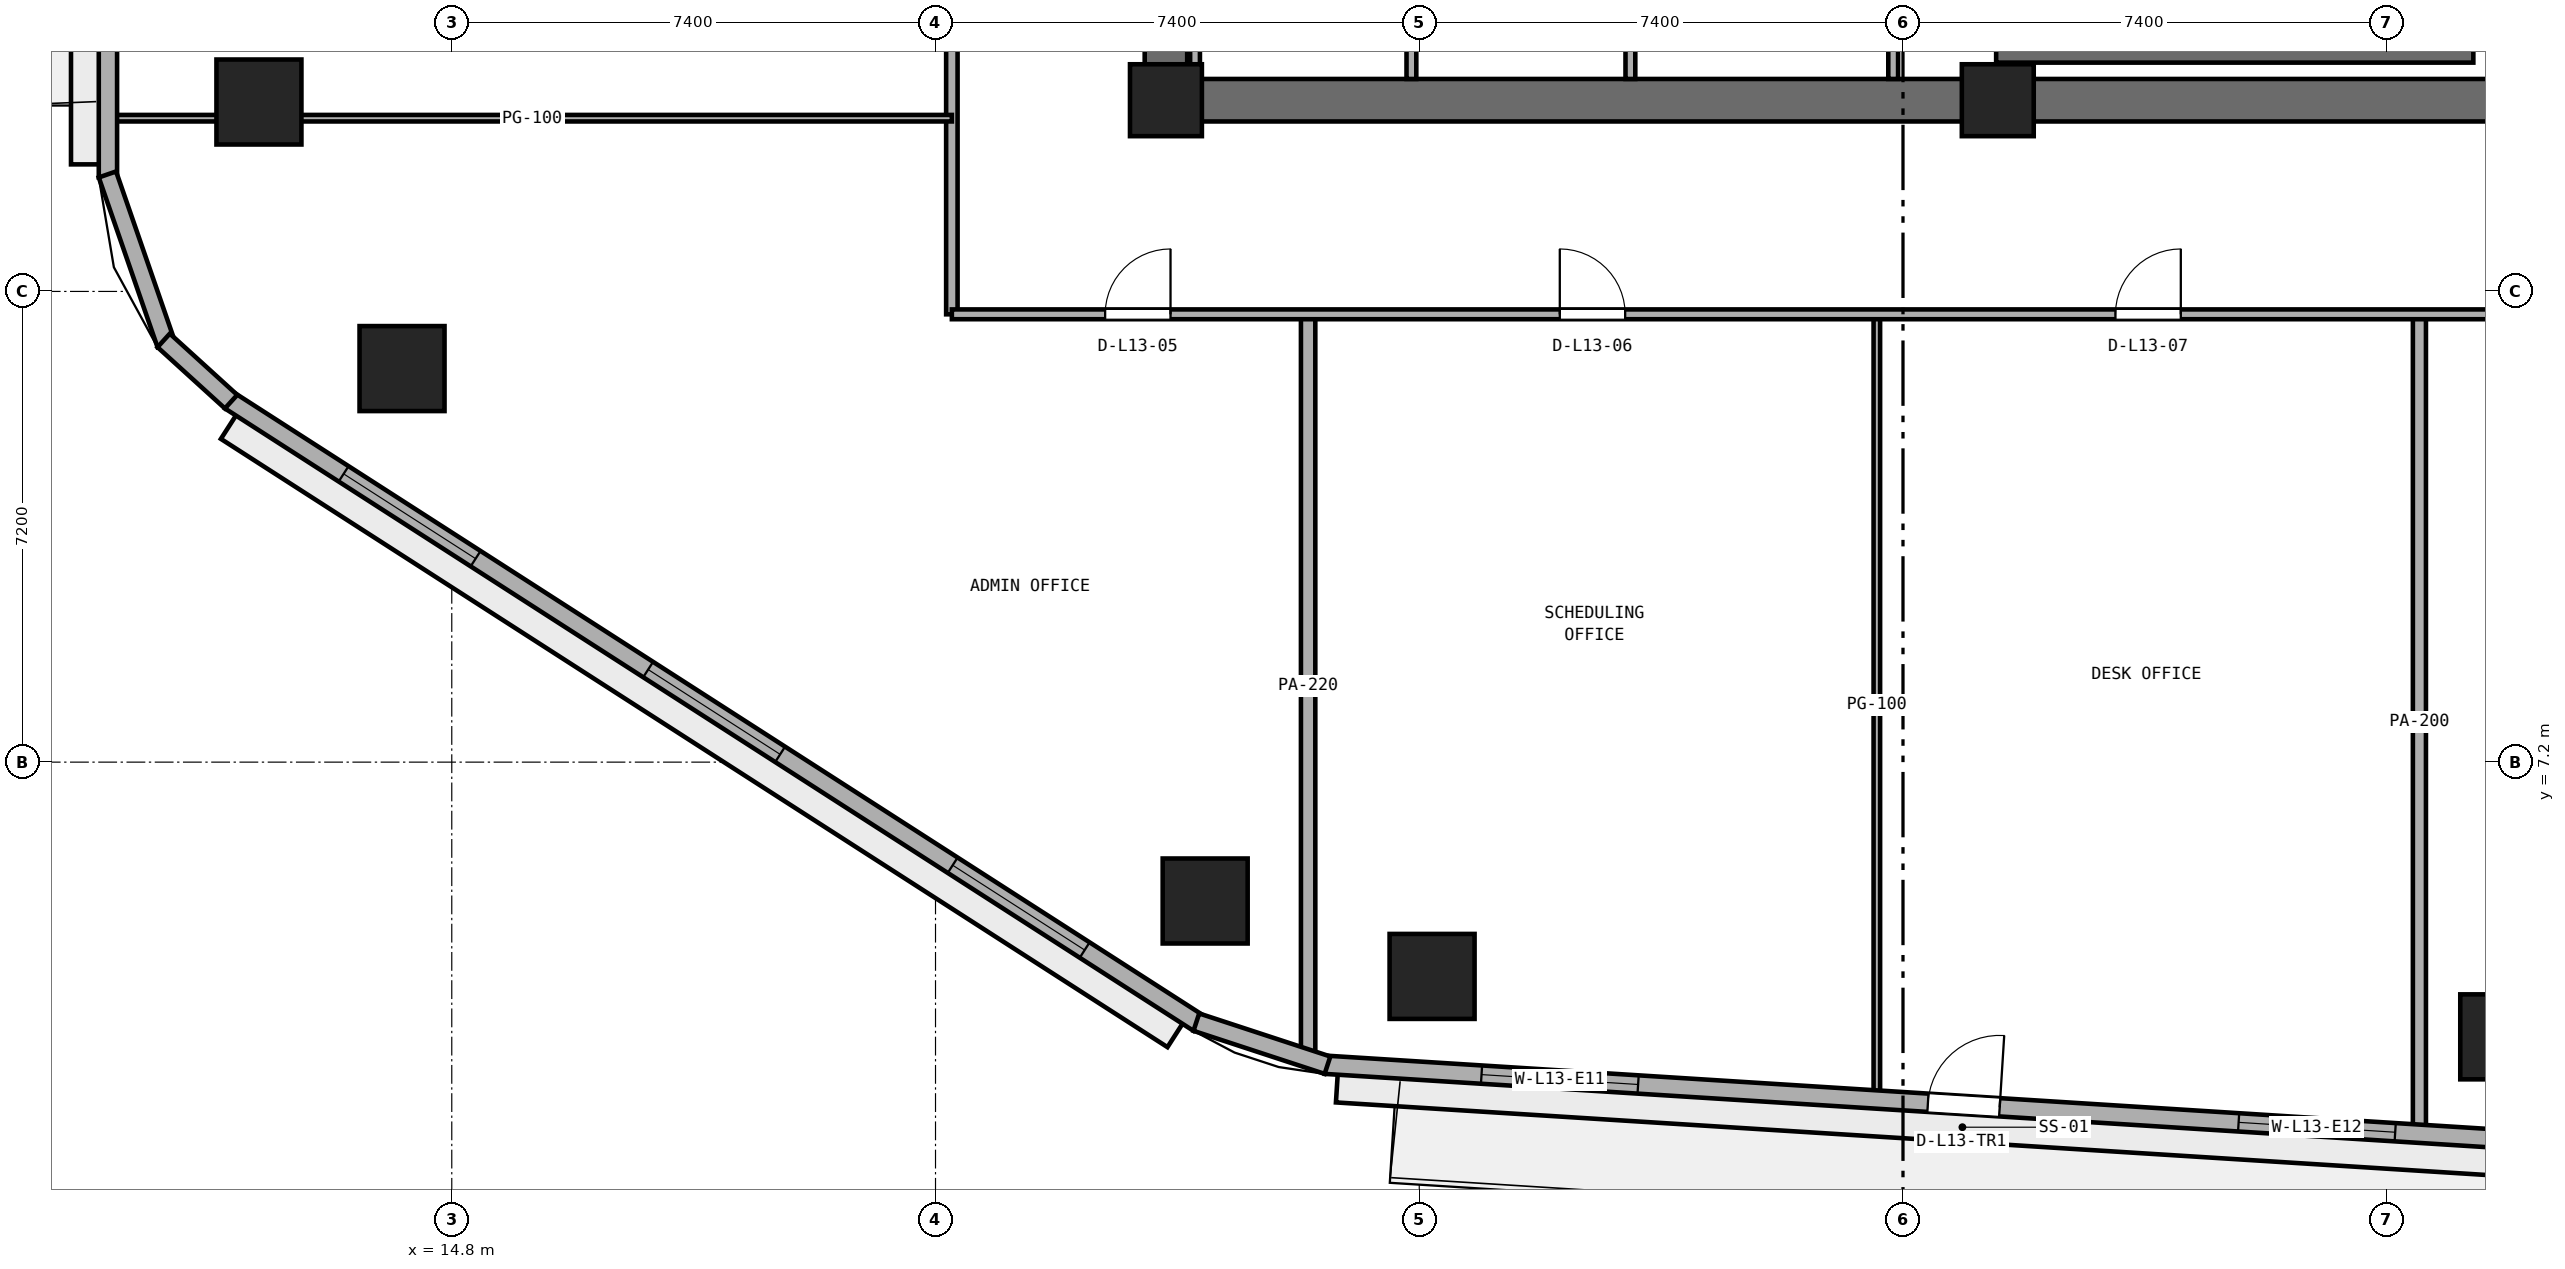
"""IFC4 building model, lengths in metres.
Left out: names, types, materials, properties, quantities, classifications, styles, units other than length and angle.
Written with IfcOpenShell. Run it as: python <this file> out.ifc"""

import sys

from ifc_helpers import new_model, si_unit, direction, frame, frame_2d, origin, origin_2d, place, context, subcontext, project, spatial, rectangle, extrude, element, fill, save


model = new_model("IFC4")
c1 = context("Model", 3, precision=1e-05, world=origin(), true_north=direction((0.0, 1.0)))
c2 = subcontext(c1, "Body", "Model", "MODEL_VIEW")
j1 = project(units=[si_unit("LENGTHUNIT", "METRE"), si_unit("PLANEANGLEUNIT", "RADIAN")], contexts=[c1])
p1 = place(None, origin())
s1 = spatial("IfcSite", under=j1, at=p1, CompositionType="ELEMENT")
p2 = place(p1, origin())
s2 = spatial("IfcBuilding", under=s1, at=p2, CompositionType="ELEMENT")
p3 = place(p2, frame((0.0, 0.0, 55.4)))
s3 = spatial("IfcBuildingStorey", under=s2, at=p3, CompositionType="ELEMENT", Elevation=55.4)
p4 = place(p3, frame((25.4, 17.325, 0.0), z_axis=(0.0, 0.0, 1.0), x_axis=(1.0, 0.0, 0.0)))
e1 = element("IfcWall", 1, at=p4, inside=s3, PredefinedType="SHEAR", context=c2, shape_type="SweptSolid", body=[
    extrude(rectangle(XDim=23.2, YDim=0.65, at=frame_2d((11.6, 0.0))), origin(), (0.0, 0.0, 1.0), 3.525),
])
p5 = place(p3, frame((25.725, 17.65, 0.0), z_axis=(0.0, 0.0, 1.0), x_axis=(0.0, 1.0, 0.0)))
e2 = element("IfcWall", 2, at=p5, inside=s3, PredefinedType="SHEAR", context=c2, shape_type="SweptSolid", body=[
    extrude(rectangle(XDim=15.1, YDim=0.65, at=frame_2d((7.55, 0.0))), origin(), (0.0, 0.0, 1.0), 3.525),
])
p6 = place(p5, frame((6.8, 0.0, 0.0)))
e3 = element("IfcOpeningElement", 3, at=p6, cuts=e2, PredefinedType="OPENING", context=c2, shape_type="SweptSolid", body=[
    extrude(rectangle(XDim=1.5, YDim=2.15, at=frame_2d((0.75, 1.075))), frame((0.0, 0.335, 0.0), z_axis=(0.0, -1.0, 0.0), x_axis=(1.0, 0.0, 0.0)), (0.0, 0.0, 1.0), 0.67),
])
for number, where, z_axis, x_axis in (
    (4, (25.725, 17.325, 0.0), (0.0, 0.0, 1.0), (1.0, 0.0, 0.0)),
    (5, (38.45, 17.325, 0.0), (0.0, 0.0, 1.0), (1.0, 0.0, 0.0)),
):
    element("IfcColumn", number, at=place(p3, frame(where, z_axis=z_axis, x_axis=x_axis)), inside=s3, PredefinedType="PILASTER", context=c2, shape_type="SweptSolid", body=[
        extrude(rectangle(XDim=1.1, YDim=1.1, at=origin_2d()), origin(), (0.0, 0.0, 1.0), 3.8),
    ])
for number, where, z_axis, x_axis in (
    (6, (29.796, 3.922, 0.0), (0.0, 0.0, 1.0), (1.0, 0.0, 0.0)),
    (7, (46.175, 2.998, 0.0), (0.0, 0.0, 1.0), (1.0, 0.0, 0.0)),
    (8, (11.85, 17.298, 0.0), (0.0, 0.0, 1.0), (1.0, 0.0, 0.0)),
    (9, (14.039, 13.22, 0.0), (0.0, 0.0, 1.0), (1.0, 0.0, 0.0)),
    (10, (26.325, 5.076, 0.0), (0.0, 0.0, 1.0), (1.0, 0.0, 0.0)),
):
    element("IfcColumn", number, at=place(p3, frame(where, z_axis=z_axis, x_axis=x_axis)), inside=s3, PredefinedType="COLUMN", context=c2, shape_type="SweptSolid", body=[
        extrude(rectangle(XDim=1.3, YDim=1.3, at=origin_2d()), origin(), (0.0, 0.0, 1.0), 3.8),
    ])
p7 = place(p3, frame((38.425, 18.025, 0.0), z_axis=(0.0, 0.0, 1.0), x_axis=(1.0, 0.0, 0.0)))
e11 = element("IfcWall", 11, at=p7, inside=s3, PredefinedType="SHEAR", context=c2, shape_type="SweptSolid", body=[
    extrude(rectangle(XDim=7.3, YDim=0.25, at=frame_2d((3.65, 0.0))), origin(), (0.0, 0.0, 1.0), 3.525),
])
for number, where, z_axis, x_axis in (
    (12, (26.17, 17.65, 0.0), (0.0, 0.0, 1.0), (0.0, 1.0, 0.0)),
    (13, (29.48, 17.65, 0.0), (0.0, 0.0, 1.0), (0.0, 1.0, 0.0)),
    (14, (32.83, 17.65, 0.0), (0.0, 0.0, 1.0), (0.0, 1.0, 0.0)),
    (15, (36.85, 17.65, 0.0), (0.0, 0.0, 1.0), (0.0, 1.0, 0.0)),
):
    element("IfcWall", number, at=place(p3, frame(where, z_axis=z_axis, x_axis=x_axis)), inside=s3, PredefinedType="PARTITIONING", context=c2, shape_type="SweptSolid", body=[
        extrude(rectangle(XDim=2.1, YDim=0.15, at=frame_2d((1.05, 0.0))), origin(), (0.0, 0.0, 1.0), 3.525),
    ])
p8 = place(p3, frame((44.9, 1.58, 0.0), z_axis=(0.0, 0.0, 1.0), x_axis=(0.0, 1.0, 0.0)))
e16 = element("IfcWall", 16, at=p8, inside=s3, PredefinedType="PARTITIONING", context=c2, shape_type="SweptSolid", body=[
    extrude(rectangle(XDim=12.47, YDim=0.2, at=frame_2d((6.235, 0.0))), origin(), (0.0, 0.0, 1.0), 3.525),
])
p9 = place(p3, frame((36.6, 2.104, 0.0), z_axis=(0.0, 0.0, 1.0), x_axis=(0.0, 1.0, 0.0)))
e17 = element("IfcWall", 17, at=p9, inside=s3, PredefinedType="PARTITIONING", context=c2, shape_type="SweptSolid", body=[
    extrude(rectangle(XDim=11.947, YDim=0.1, at=frame_2d((5.973, 0.0))), origin(), (0.0, 0.0, 1.0), 3.525),
])
p10 = place(p3, frame((27.9, 2.674, 0.0), z_axis=(0.0, 0.0, 1.0), x_axis=(0.0, 1.0, 0.0)))
e18 = element("IfcWall", 18, at=p10, inside=s3, PredefinedType="PARTITIONING", context=c2, shape_type="SweptSolid", body=[
    extrude(rectangle(XDim=11.376, YDim=0.22, at=frame_2d((5.688, 0.0))), origin(), (0.0, 0.0, 1.0), 3.525),
])
p11 = place(p3, frame((22.45, 14.05, 0.0), z_axis=(0.0, 0.0, 1.0), x_axis=(0.0, 1.0, 0.0)))
e19 = element("IfcWall", 19, at=p11, inside=s3, PredefinedType="PARTITIONING", context=c2, shape_type="SweptSolid", body=[
    extrude(rectangle(XDim=22.3, YDim=0.175, at=frame_2d((11.15, 0.0))), origin(), (0.0, 0.0, 1.0), 3.525),
])
p12 = place(p11, frame((5.075, 0.0, 0.0)))
e20 = element("IfcOpeningElement", 20, at=p12, cuts=e19, PredefinedType="OPENING", context=c2, shape_type="SweptSolid", body=[
    extrude(rectangle(XDim=0.9, YDim=2.1, at=frame_2d((0.45, 1.05))), frame((0.0, 0.097, 0.0), z_axis=(0.0, -1.0, 0.0), x_axis=(1.0, 0.0, 0.0)), (0.0, 0.0, 1.0), 0.195),
])
p13 = place(p11, frame((11.35, 0.0, 0.0)))
e21 = element("IfcOpeningElement", 21, at=p13, cuts=e19, PredefinedType="OPENING", context=c2, shape_type="SweptSolid", body=[
    extrude(rectangle(XDim=0.9, YDim=2.1, at=frame_2d((0.45, 1.05))), frame((0.0, 0.097, 0.0), z_axis=(0.0, -1.0, 0.0), x_axis=(1.0, 0.0, 0.0)), (0.0, 0.0, 1.0), 0.195),
])
p14 = place(p11, frame((16.975, 0.0, 0.0)))
e22 = element("IfcOpeningElement", 22, at=p14, cuts=e19, PredefinedType="OPENING", context=c2, shape_type="SweptSolid", body=[
    extrude(rectangle(XDim=0.9, YDim=2.1, at=frame_2d((0.45, 1.05))), frame((0.0, 0.097, 0.0), z_axis=(0.0, -1.0, 0.0), x_axis=(1.0, 0.0, 0.0)), (0.0, 0.0, 1.0), 0.195),
])
p15 = place(p3, frame((22.45, 14.05, 0.0), z_axis=(0.0, 0.0, 1.0), x_axis=(1.0, 0.0, 0.0)))
e23 = element("IfcWall", 23, at=p15, inside=s3, PredefinedType="PARTITIONING", context=c2, shape_type="SweptSolid", body=[
    extrude(rectangle(XDim=29.1, YDim=0.15, at=frame_2d((14.55, 0.0))), origin(), (0.0, 0.0, 1.0), 3.525),
])
p16 = place(p15, frame((2.345, 0.0, 0.0)))
e24 = element("IfcOpeningElement", 24, at=p16, cuts=e23, PredefinedType="OPENING", context=c2, shape_type="SweptSolid", body=[
    extrude(rectangle(XDim=1.0, YDim=2.12, at=frame_2d((0.5, 1.06))), frame((0.0, 0.085, 0.0), z_axis=(0.0, -1.0, 0.0), x_axis=(1.0, 0.0, 0.0)), (0.0, 0.0, 1.0), 0.17),
])
p17 = place(p15, frame((9.3, 0.0, 0.0)))
e25 = element("IfcOpeningElement", 25, at=p17, cuts=e23, PredefinedType="OPENING", context=c2, shape_type="SweptSolid", body=[
    extrude(rectangle(XDim=1.0, YDim=2.12, at=frame_2d((0.5, 1.06))), frame((0.0, 0.085, 0.0), z_axis=(0.0, -1.0, 0.0), x_axis=(1.0, 0.0, 0.0)), (0.0, 0.0, 1.0), 0.17),
])
p18 = place(p15, frame((17.8, 0.0, 0.0)))
e26 = element("IfcOpeningElement", 26, at=p18, cuts=e23, PredefinedType="OPENING", context=c2, shape_type="SweptSolid", body=[
    extrude(rectangle(XDim=1.0, YDim=2.12, at=frame_2d((0.5, 1.06))), frame((0.0, 0.085, 0.0), z_axis=(0.0, -1.0, 0.0), x_axis=(1.0, 0.0, 0.0)), (0.0, 0.0, 1.0), 0.17),
])
p19 = place(p15, frame((25.155, 0.0, 0.0)))
e27 = element("IfcOpeningElement", 27, at=p19, cuts=e23, PredefinedType="OPENING", context=c2, shape_type="SweptSolid", body=[
    extrude(rectangle(XDim=1.0, YDim=2.12, at=frame_2d((0.5, 1.06))), frame((0.0, 0.085, 0.0), z_axis=(0.0, -1.0, 0.0), x_axis=(1.0, 0.0, 0.0)), (0.0, 0.0, 1.0), 0.17),
])
p20 = place(p3, frame((9.605, 17.05, 0.0), z_axis=(0.0, 0.0, 1.0), x_axis=(1.0, 0.0, 0.0)))
e28 = element("IfcWall", 28, at=p20, inside=s3, PredefinedType="PARTITIONING", context=c2, shape_type="SweptSolid", body=[
    extrude(rectangle(XDim=12.845, YDim=0.1, at=frame_2d((6.422, 0.0))), origin(), (0.0, 0.0, 1.0), 3.525),
])
p21 = place(p3, frame((28.161, 2.571, 0.0), z_axis=(0.0, 0.0, 1.0), x_axis=(0.998017288298, -0.06294038654, 0.0)))
e29 = element("IfcWall", 29, at=p21, inside=s3, PredefinedType="STANDARD", context=c2, shape_type="SweptSolid", body=[
    extrude(rectangle(XDim=19.577, YDim=0.28, at=frame_2d((9.789, 0.0))), origin(), (0.0, 0.0, 1.0), 3.525),
])
p22 = place(p21, frame((9.239, 0.0, 0.0)))
e30 = element("IfcOpeningElement", 30, at=p22, cuts=e29, PredefinedType="OPENING", context=c2, shape_type="SweptSolid", body=[
    extrude(rectangle(XDim=1.1, YDim=2.2, at=frame_2d((0.55, 1.1))), frame((0.0, 0.15, 0.0), z_axis=(0.0, -1.0, 0.0), x_axis=(1.0, 0.0, 0.0)), (0.0, 0.0, 1.0), 0.3),
])
p23 = place(p21, frame((2.396, 0.0, 0.9)))
e31 = element("IfcOpeningElement", 31, at=p23, cuts=e29, PredefinedType="OPENING", context=c2, shape_type="SweptSolid", body=[
    extrude(rectangle(XDim=2.4, YDim=1.75, at=frame_2d((1.2, 0.875))), frame((0.0, 0.15, 0.0), z_axis=(0.0, -1.0, 0.0), x_axis=(1.0, 0.0, 0.0)), (0.0, 0.0, 1.0), 0.3),
])
p24 = place(p21, frame((14.001, 0.0, 0.9)))
e32 = element("IfcOpeningElement", 32, at=p24, cuts=e29, PredefinedType="OPENING", context=c2, shape_type="SweptSolid", body=[
    extrude(rectangle(XDim=2.4, YDim=1.75, at=frame_2d((1.2, 0.875))), frame((0.0, 0.15, 0.0), z_axis=(0.0, -1.0, 0.0), x_axis=(1.0, 0.0, 0.0)), (0.0, 0.0, 1.0), 0.3),
])
p25 = place(p3, frame((9.54, 33.444, 0.0), z_axis=(0.0, 0.0, 1.0), x_axis=(0.0, -1.0, 0.0)))
e33 = element("IfcWall", 33, at=p25, inside=s3, PredefinedType="STANDARD", context=c2, shape_type="SweptSolid", body=[
    extrude(rectangle(XDim=17.301, YDim=0.28, at=frame_2d((8.65, 0.0))), origin(), (0.0, 0.0, 1.0), 3.525),
])
p26 = place(p25, frame((8.1, 0.0, 0.0)))
e34 = element("IfcOpeningElement", 34, at=p26, cuts=e33, PredefinedType="OPENING", context=c2, shape_type="SweptSolid", body=[
    extrude(rectangle(XDim=1.1, YDim=2.2, at=frame_2d((0.55, 1.1))), frame((0.0, 0.15, 0.0), z_axis=(0.0, -1.0, 0.0), x_axis=(1.0, 0.0, 0.0)), (0.0, 0.0, 1.0), 0.3),
])
p27 = place(p25, frame((12.884, 0.0, 0.9)))
e35 = element("IfcOpeningElement", 35, at=p27, cuts=e33, PredefinedType="OPENING", context=c2, shape_type="SweptSolid", body=[
    extrude(rectangle(XDim=2.4, YDim=1.75, at=frame_2d((1.2, 0.875))), frame((0.0, 0.15, 0.0), z_axis=(0.0, -1.0, 0.0), x_axis=(1.0, 0.0, 0.0)), (0.0, 0.0, 1.0), 0.3),
])
p28 = place(p3, frame((11.405, 12.728, 0.0), z_axis=(0.0, 0.0, 1.0), x_axis=(0.841304564637, -0.540561402175, 0.0)))
e36 = element("IfcWall", 36, at=p28, inside=s3, PredefinedType="STANDARD", context=c2, shape_type="SweptSolid", body=[
    extrude(rectangle(XDim=17.612, YDim=0.28, at=frame_2d((8.806, 0.0))), origin(), (0.0, 0.0, 1.0), 3.525),
])
p29 = place(p28, frame((2.069, 0.0, 0.9)))
e37 = element("IfcOpeningElement", 37, at=p29, cuts=e36, PredefinedType="OPENING", context=c2, shape_type="SweptSolid", body=[
    extrude(rectangle(XDim=2.4, YDim=1.75, at=frame_2d((1.2, 0.875))), frame((0.0, 0.15, 0.0), z_axis=(0.0, -1.0, 0.0), x_axis=(1.0, 0.0, 0.0)), (0.0, 0.0, 1.0), 0.3),
])
p30 = place(p28, frame((7.606, 0.0, 0.9)))
e38 = element("IfcOpeningElement", 38, at=p30, cuts=e36, PredefinedType="OPENING", context=c2, shape_type="SweptSolid", body=[
    extrude(rectangle(XDim=2.4, YDim=1.75, at=frame_2d((1.2, 0.875))), frame((0.0, 0.15, 0.0), z_axis=(0.0, -1.0, 0.0), x_axis=(1.0, 0.0, 0.0)), (0.0, 0.0, 1.0), 0.3),
])
p31 = place(p28, frame((13.143, 0.0, 0.9)))
e39 = element("IfcOpeningElement", 39, at=p31, cuts=e36, PredefinedType="OPENING", context=c2, shape_type="SweptSolid", body=[
    extrude(rectangle(XDim=2.4, YDim=1.75, at=frame_2d((1.2, 0.875))), frame((0.0, 0.15, 0.0), z_axis=(0.0, -1.0, 0.0), x_axis=(1.0, 0.0, 0.0)), (0.0, 0.0, 1.0), 0.3),
])
p32 = place(p3, frame((9.532, 16.189, 0.0), z_axis=(0.0, 0.0, 1.0), x_axis=(0.32708309668, -0.944995580871, 0.0)))
e40 = element("IfcWall", 40, at=p32, inside=s3, PredefinedType="STANDARD", context=c2, shape_type="SweptSolid", body=[
    extrude(rectangle(XDim=2.748, YDim=0.28, at=frame_2d((1.374, 0.0))), origin(), (0.0, 0.0, 1.0), 3.525),
])
p33 = place(p3, frame((10.393, 13.651, 0.0), z_axis=(0.0, 0.0, 1.0), x_axis=(0.74003521851, -0.672568119498, 0.0)))
e41 = element("IfcWall", 41, at=p33, inside=s3, PredefinedType="STANDARD", context=c2, shape_type="SweptSolid", body=[
    extrude(rectangle(XDim=1.393, YDim=0.28, at=frame_2d((0.697, 0.0))), origin(), (0.0, 0.0, 1.0), 3.525),
])
p34 = place(p3, frame((26.19, 3.223, 0.0), z_axis=(0.0, 0.0, 1.0), x_axis=(0.95016442175, -0.311749212734, 0.0)))
e42 = element("IfcWall", 42, at=p34, inside=s3, PredefinedType="STANDARD", context=c2, shape_type="SweptSolid", body=[
    extrude(rectangle(XDim=2.111, YDim=0.28, at=frame_2d((1.056, 0.0))), origin(), (0.0, 0.0, 1.0), 3.525),
])
p35 = place(p16, origin())
e43 = element("IfcDoor", 43, at=p35, inside=s3, OperationType="SINGLE_SWING_RIGHT", PredefinedType="DOOR", context=c2, shape_type="SweptSolid", body=[
    extrude(rectangle(XDim=1.0, YDim=2.12, at=frame_2d((0.5, 1.06))), frame((0.0, 0.025, 0.0), z_axis=(0.0, -1.0, 0.0), x_axis=(1.0, 0.0, 0.0)), (0.0, 0.0, 1.0), 0.05),
])
fill(e24, e43)
p36 = place(p17, origin())
e44 = element("IfcDoor", 44, at=p36, inside=s3, OperationType="SINGLE_SWING_LEFT", PredefinedType="DOOR", context=c2, shape_type="SweptSolid", body=[
    extrude(rectangle(XDim=1.0, YDim=2.12, at=frame_2d((0.5, 1.06))), frame((0.0, 0.025, 0.0), z_axis=(0.0, -1.0, 0.0), x_axis=(1.0, 0.0, 0.0)), (0.0, 0.0, 1.0), 0.05),
])
fill(e25, e44)
p37 = place(p18, origin())
e45 = element("IfcDoor", 45, at=p37, inside=s3, OperationType="SINGLE_SWING_RIGHT", PredefinedType="DOOR", context=c2, shape_type="SweptSolid", body=[
    extrude(rectangle(XDim=1.0, YDim=2.12, at=frame_2d((0.5, 1.06))), frame((0.0, 0.025, 0.0), z_axis=(0.0, -1.0, 0.0), x_axis=(1.0, 0.0, 0.0)), (0.0, 0.0, 1.0), 0.05),
])
fill(e26, e45)
p38 = place(p22, origin())
e46 = element("IfcDoor", 46, at=p38, inside=s3, OperationType="SINGLE_SWING_RIGHT", PredefinedType="DOOR", context=c2, shape_type="SweptSolid", body=[
    extrude(rectangle(XDim=1.1, YDim=2.2, at=frame_2d((0.55, 1.1))), frame((0.0, 0.025, 0.0), z_axis=(0.0, -1.0, 0.0), x_axis=(1.0, 0.0, 0.0)), (0.0, 0.0, 1.0), 0.05),
])
fill(e30, e46)
p39 = place(p23, origin())
e47 = element("IfcWindow", 47, at=p39, inside=s3, PartitioningType="SINGLE_PANEL", PredefinedType="WINDOW", context=c2, shape_type="SweptSolid", body=[
    extrude(rectangle(XDim=2.4, YDim=1.75, at=frame_2d((1.2, 0.875))), frame((0.0, 0.03, 0.0), z_axis=(0.0, -1.0, 0.0), x_axis=(1.0, 0.0, 0.0)), (0.0, 0.0, 1.0), 0.06),
])
fill(e31, e47)
p40 = place(p24, origin())
e48 = element("IfcWindow", 48, at=p40, inside=s3, PartitioningType="SINGLE_PANEL", PredefinedType="WINDOW", context=c2, shape_type="SweptSolid", body=[
    extrude(rectangle(XDim=2.4, YDim=1.75, at=frame_2d((1.2, 0.875))), frame((0.0, 0.03, 0.0), z_axis=(0.0, -1.0, 0.0), x_axis=(1.0, 0.0, 0.0)), (0.0, 0.0, 1.0), 0.06),
])
fill(e32, e48)
p41 = place(p29, origin())
e49 = element("IfcWindow", 49, at=p41, inside=s3, PartitioningType="SINGLE_PANEL", PredefinedType="WINDOW", context=c2, shape_type="SweptSolid", body=[
    extrude(rectangle(XDim=2.4, YDim=1.75, at=frame_2d((1.2, 0.875))), frame((0.0, 0.03, 0.0), z_axis=(0.0, -1.0, 0.0), x_axis=(1.0, 0.0, 0.0)), (0.0, 0.0, 1.0), 0.06),
])
fill(e37, e49)
p42 = place(p30, origin())
e50 = element("IfcWindow", 50, at=p42, inside=s3, PartitioningType="SINGLE_PANEL", PredefinedType="WINDOW", context=c2, shape_type="SweptSolid", body=[
    extrude(rectangle(XDim=2.4, YDim=1.75, at=frame_2d((1.2, 0.875))), frame((0.0, 0.03, 0.0), z_axis=(0.0, -1.0, 0.0), x_axis=(1.0, 0.0, 0.0)), (0.0, 0.0, 1.0), 0.06),
])
fill(e38, e50)
p43 = place(p31, origin())
e51 = element("IfcWindow", 51, at=p43, inside=s3, PartitioningType="SINGLE_PANEL", PredefinedType="WINDOW", context=c2, shape_type="SweptSolid", body=[
    extrude(rectangle(XDim=2.4, YDim=1.75, at=frame_2d((1.2, 0.875))), frame((0.0, 0.03, 0.0), z_axis=(0.0, -1.0, 0.0), x_axis=(1.0, 0.0, 0.0)), (0.0, 0.0, 1.0), 0.06),
])
fill(e39, e51)
save(model, sys.argv[1])
